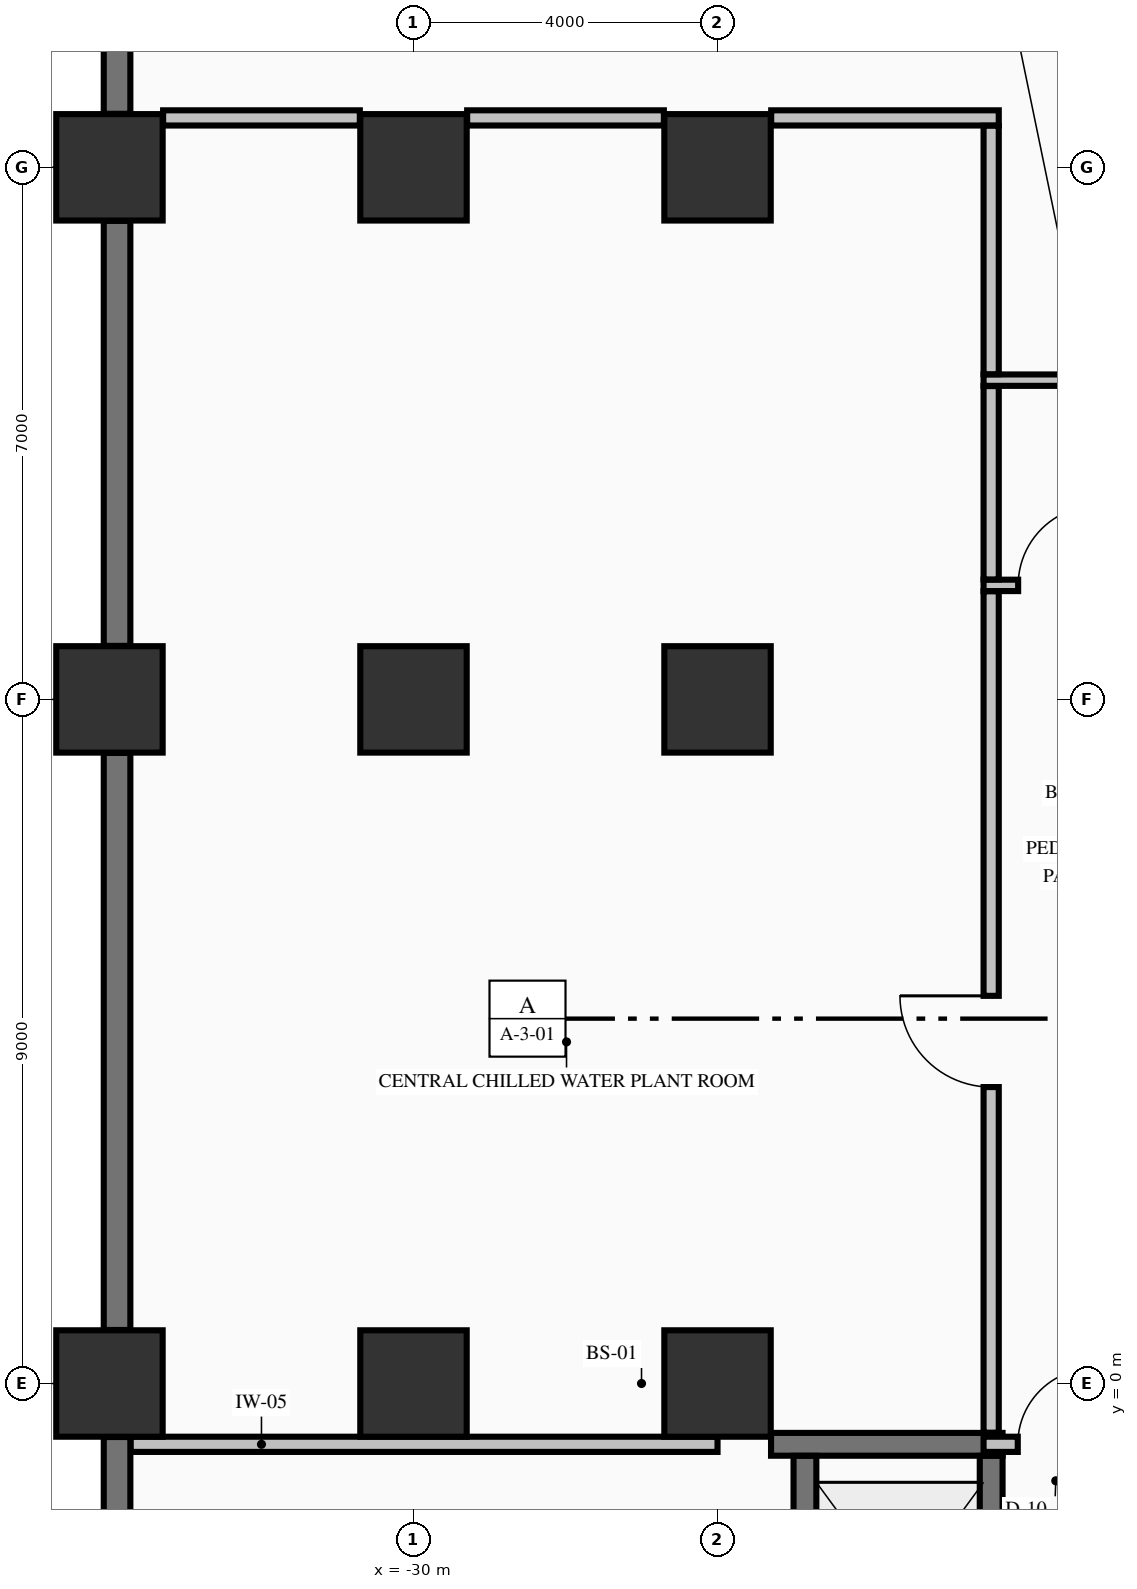
"""IFC4 building model, lengths in metres.
Left out: names, types, materials, properties, quantities, classifications, styles, units other than length and angle.
Written with IfcOpenShell. Run it as: python <this file> out.ifc"""

import sys

from ifc_helpers import new_model, si_unit, direction, frame, frame_2d, origin, origin_2d, place, context, subcontext, project, spatial, rectangle, extrude, element, fill, save


model = new_model("IFC4")
c1 = context("Model", 3, precision=1e-05, world=origin(), true_north=direction((0.0, 1.0)))
c2 = subcontext(c1, "Body", "Model", "MODEL_VIEW")
j1 = project(units=[si_unit("LENGTHUNIT", "METRE"), si_unit("PLANEANGLEUNIT", "RADIAN")], contexts=[c1])
p1 = place(None, origin())
s1 = spatial("IfcSite", under=j1, at=p1, CompositionType="ELEMENT")
p2 = place(p1, origin())
s2 = spatial("IfcBuilding", under=s1, at=p2, CompositionType="ELEMENT")
p3 = place(p2, frame((0.0, 0.0, -9.1)))
s3 = spatial("IfcBuildingStorey", under=s2, at=p3, CompositionType="ELEMENT", Elevation=-9.1)
for number, where, z_axis, x_axis in (
    (1, (-34.0, 0.0, -0.45), (0.0, 0.0, 1.0), (1.0, 0.0, 0.0)),
    (2, (-34.0, 9.0, -0.45), (0.0, 0.0, 1.0), (1.0, 0.0, 0.0)),
    (3, (-34.0, 16.0, -0.45), (0.0, 0.0, 1.0), (1.0, 0.0, 0.0)),
    (4, (-30.0, 0.0, -0.45), (0.0, 0.0, 1.0), (1.0, 0.0, 0.0)),
    (5, (-30.0, 9.0, -0.45), (0.0, 0.0, 1.0), (1.0, 0.0, 0.0)),
    (6, (-30.0, 16.0, -0.45), (0.0, 0.0, 1.0), (1.0, 0.0, 0.0)),
    (7, (-26.0, 0.0, -0.45), (0.0, 0.0, 1.0), (1.0, 0.0, 0.0)),
    (8, (-26.0, 9.0, -0.45), (0.0, 0.0, 1.0), (1.0, 0.0, 0.0)),
    (9, (-26.0, 16.0, -0.45), (0.0, 0.0, 1.0), (1.0, 0.0, 0.0)),
):
    element("IfcColumn", number, at=place(p3, frame(where, z_axis=z_axis, x_axis=x_axis)), inside=s3, PredefinedType="COLUMN", context=c2, shape_type="SweptSolid", body=[
        extrude(rectangle(XDim=1.4, YDim=1.4, at=origin_2d()), origin(), (0.0, 0.0, 1.0), 4.65),
    ])
p4 = place(p3, frame((-25.296, -0.8, 0.0), z_axis=(0.0, 0.0, 1.0), x_axis=(1.0, 0.0, 0.0)))
e10 = element("IfcWall", 10, at=p4, inside=s3, PredefinedType="SHEAR", context=c2, shape_type="SweptSolid", body=[
    extrude(rectangle(XDim=3.046, YDim=0.3, at=frame_2d((1.523, 0.0))), origin(), (0.0, 0.0, 1.0), 4.2),
])
p5 = place(p3, frame((-33.722, -0.8, 0.0), z_axis=(0.0, 0.0, 1.0), x_axis=(1.0, 0.0, 0.0)))
e11 = element("IfcWall", 11, at=p5, inside=s3, PredefinedType="PARTITIONING", context=c2, shape_type="SweptSolid", body=[
    extrude(rectangle(XDim=7.722, YDim=0.2, at=frame_2d((3.861, 0.0))), origin(), (0.0, 0.0, 1.0), 4.2),
])
p6 = place(p3, frame((-22.5, -0.8, 0.0), z_axis=(0.0, 0.0, 1.0), x_axis=(1.0, 0.0, 0.0)))
e12 = element("IfcWall", 12, at=p6, inside=s3, PredefinedType="PARTITIONING", context=c2, shape_type="SweptSolid", body=[
    extrude(rectangle(XDim=1.694, YDim=0.2, at=frame_2d((0.847, 0.0))), origin(), (0.0, 0.0, 1.0), 4.2),
])
p7 = place(p6, frame((0.45, 0.0, 0.0)))
e13 = element("IfcOpeningElement", 13, at=p7, cuts=e12, PredefinedType="OPENING", context=c2, shape_type="SweptSolid", body=[
    extrude(rectangle(XDim=1.0, YDim=2.15, at=frame_2d((0.5, 1.075))), frame((0.0, 0.11, 0.0), z_axis=(0.0, -1.0, 0.0), x_axis=(1.0, 0.0, 0.0)), (0.0, 0.0, 1.0), 0.22),
])
p8 = place(p3, frame((-22.5, 10.5, 0.0), z_axis=(0.0, 0.0, 1.0), x_axis=(1.0, 0.0, 0.0)))
e14 = element("IfcWall", 14, at=p8, inside=s3, PredefinedType="PARTITIONING", context=c2, shape_type="SweptSolid", body=[
    extrude(rectangle(XDim=2.5, YDim=0.15, at=frame_2d((1.25, 0.0))), origin(), (0.0, 0.0, 1.0), 4.2),
])
p9 = place(p8, frame((0.455, 0.0, 0.0)))
e15 = element("IfcOpeningElement", 15, at=p9, cuts=e14, PredefinedType="OPENING", context=c2, shape_type="SweptSolid", body=[
    extrude(rectangle(XDim=1.05, YDim=2.15, at=frame_2d((0.525, 1.075))), frame((0.0, 0.085, 0.0), z_axis=(0.0, -1.0, 0.0), x_axis=(1.0, 0.0, 0.0)), (0.0, 0.0, 1.0), 0.17),
])
p10 = place(p3, frame((-22.5, 13.2, 0.0), z_axis=(0.0, 0.0, 1.0), x_axis=(1.0, 0.0, 0.0)))
e16 = element("IfcWall", 16, at=p10, inside=s3, PredefinedType="PARTITIONING", context=c2, shape_type="SweptSolid", body=[
    extrude(rectangle(XDim=45.0, YDim=0.15, at=frame_2d((22.5, 0.0))), origin(), (0.0, 0.0, 1.0), 4.2),
])
p11 = place(p10, frame((43.15, 0.0, 0.0)))
e17 = element("IfcOpeningElement", 17, at=p11, cuts=e16, PredefinedType="OPENING", context=c2, shape_type="SweptSolid", body=[
    extrude(rectangle(XDim=1.1, YDim=2.15, at=frame_2d((0.55, 1.075))), frame((0.0, 0.085, 0.0), z_axis=(0.0, -1.0, 0.0), x_axis=(1.0, 0.0, 0.0)), (0.0, 0.0, 1.0), 0.17),
])
p12 = place(p10, frame((27.4, 0.0, 0.0)))
e18 = element("IfcOpeningElement", 18, at=p12, cuts=e16, PredefinedType="OPENING", context=c2, shape_type="SweptSolid", body=[
    extrude(rectangle(XDim=1.2, YDim=2.15, at=frame_2d((0.6, 1.075))), frame((0.0, 0.085, 0.0), z_axis=(0.0, -1.0, 0.0), x_axis=(1.0, 0.0, 0.0)), (0.0, 0.0, 1.0), 0.17),
])
for number, where, z_axis, x_axis in (
    (19, (-33.294, 16.65, 0.0), (0.0, 0.0, 1.0), (1.0, 0.0, 0.0)),
    (20, (-29.294, 16.65, 0.0), (0.0, 0.0, 1.0), (1.0, 0.0, 0.0)),
):
    element("IfcWall", number, at=place(p3, frame(where, z_axis=z_axis, x_axis=x_axis)), inside=s3, PredefinedType="PARTITIONING", context=c2, shape_type="SweptSolid", body=[
        extrude(rectangle(XDim=2.588, YDim=0.2, at=frame_2d((1.294, 0.0))), origin(), (0.0, 0.0, 1.0), 4.2),
    ])
p13 = place(p3, frame((-25.294, 16.65, 0.0), z_axis=(0.0, 0.0, 1.0), x_axis=(1.0, 0.0, 0.0)))
e21 = element("IfcWall", 21, at=p13, inside=s3, PredefinedType="PARTITIONING", context=c2, shape_type="SweptSolid", body=[
    extrude(rectangle(XDim=2.994, YDim=0.2, at=frame_2d((1.497, 0.0))), origin(), (0.0, 0.0, 1.0), 4.2),
])
for number, where, z_axis, x_axis in (
    (22, (-33.9, -8.296, 0.0), (0.0, 0.0, 1.0), (0.0, 1.0, 0.0)),
    (23, (-33.9, 0.704, 0.0), (0.0, 0.0, 1.0), (0.0, 1.0, 0.0)),
):
    element("IfcWall", number, at=place(p3, frame(where, z_axis=z_axis, x_axis=x_axis)), inside=s3, PredefinedType="SHEAR", context=c2, shape_type="SweptSolid", body=[
        extrude(rectangle(XDim=7.592, YDim=0.35, at=frame_2d((3.796, 0.0))), origin(), (0.0, 0.0, 1.0), 4.2),
    ])
p14 = place(p3, frame((-33.9, 9.704, 0.0), z_axis=(0.0, 0.0, 1.0), x_axis=(0.0, 1.0, 0.0)))
e24 = element("IfcWall", 24, at=p14, inside=s3, PredefinedType="SHEAR", context=c2, shape_type="SweptSolid", body=[
    extrude(rectangle(XDim=5.592, YDim=0.35, at=frame_2d((2.796, 0.0))), origin(), (0.0, 0.0, 1.0), 4.2),
])
p15 = place(p3, frame((-33.9, 16.704, 0.0), z_axis=(0.0, 0.0, 1.0), x_axis=(0.0, 1.0, 0.0)))
e25 = element("IfcWall", 25, at=p15, inside=s3, PredefinedType="SHEAR", context=c2, shape_type="SweptSolid", body=[
    extrude(rectangle(XDim=4.592, YDim=0.35, at=frame_2d((2.296, 0.0))), origin(), (0.0, 0.0, 1.0), 4.2),
])
p16 = place(p3, frame((-24.85, -4.648, 0.0), z_axis=(0.0, 0.0, 1.0), x_axis=(0.0, 1.0, 0.0)))
e26 = element("IfcWall", 26, at=p16, inside=s3, PredefinedType="SHEAR", context=c2, shape_type="SweptSolid", body=[
    extrude(rectangle(XDim=3.696, YDim=0.3, at=frame_2d((1.848, 0.0))), origin(), (0.0, 0.0, 1.0), 4.2),
])
p17 = place(p3, frame((-22.4, -4.648, 0.0), z_axis=(0.0, 0.0, 1.0), x_axis=(0.0, 1.0, 0.0)))
e27 = element("IfcWall", 27, at=p17, inside=s3, PredefinedType="SHEAR", context=c2, shape_type="SweptSolid", body=[
    extrude(rectangle(XDim=3.696, YDim=0.3, at=frame_2d((1.848, 0.0))), origin(), (0.0, 0.0, 1.0), 4.2),
])
p18 = place(p17, frame((1.198, 0.0, 0.0)))
e28 = element("IfcOpeningElement", 28, at=p18, cuts=e27, PredefinedType="OPENING", context=c2, shape_type="SweptSolid", body=[
    extrude(rectangle(XDim=1.3, YDim=2.3, at=frame_2d((0.65, 1.15))), frame((0.0, 0.16, 0.0), z_axis=(0.0, -1.0, 0.0), x_axis=(1.0, 0.0, 0.0)), (0.0, 0.0, 1.0), 0.32),
])
p19 = place(p3, frame((-22.4, -0.647, 0.0), z_axis=(0.0, 0.0, 1.0), x_axis=(0.0, 1.0, 0.0)))
e29 = element("IfcWall", 29, at=p19, inside=s3, PredefinedType="PARTITIONING", context=c2, shape_type="SweptSolid", body=[
    extrude(rectangle(XDim=11.069, YDim=0.2, at=frame_2d((5.535, 0.0))), origin(), (0.0, 0.0, 1.0), 4.2),
])
p20 = place(p19, frame((4.547, 0.0, 0.0)))
e30 = element("IfcOpeningElement", 30, at=p20, cuts=e29, PredefinedType="OPENING", context=c2, shape_type="SweptSolid", body=[
    extrude(rectangle(XDim=1.2, YDim=2.15, at=frame_2d((0.6, 1.075))), frame((0.0, 0.11, 0.0), z_axis=(0.0, -1.0, 0.0), x_axis=(1.0, 0.0, 0.0)), (0.0, 0.0, 1.0), 0.22),
])
p21 = place(p3, frame((-22.4, 10.578, 0.0), z_axis=(0.0, 0.0, 1.0), x_axis=(0.0, 1.0, 0.0)))
e31 = element("IfcWall", 31, at=p21, inside=s3, PredefinedType="PARTITIONING", context=c2, shape_type="SweptSolid", body=[
    extrude(rectangle(XDim=2.544, YDim=0.2, at=frame_2d((1.272, 0.0))), origin(), (0.0, 0.0, 1.0), 4.2),
])
p22 = place(p3, frame((-22.4, 13.278, 0.0), z_axis=(0.0, 0.0, 1.0), x_axis=(0.0, 1.0, 0.0)))
e32 = element("IfcWall", 32, at=p22, inside=s3, PredefinedType="PARTITIONING", context=c2, shape_type="SweptSolid", body=[
    extrude(rectangle(XDim=3.269, YDim=0.2, at=frame_2d((1.635, 0.0))), origin(), (0.0, 0.0, 1.0), 4.2),
])
p23 = place(p7, origin())
e33 = element("IfcDoor", 33, at=p23, inside=s3, OperationType="SINGLE_SWING_RIGHT", PredefinedType="DOOR", context=c2, shape_type="SweptSolid", body=[
    extrude(rectangle(XDim=1.0, YDim=2.15, at=frame_2d((0.5, 1.075))), frame((0.0, 0.025, 0.0), z_axis=(0.0, -1.0, 0.0), x_axis=(1.0, 0.0, 0.0)), (0.0, 0.0, 1.0), 0.05),
])
fill(e13, e33)
p24 = place(p9, origin())
e34 = element("IfcDoor", 34, at=p24, inside=s3, OperationType="SINGLE_SWING_RIGHT", PredefinedType="DOOR", context=c2, shape_type="SweptSolid", body=[
    extrude(rectangle(XDim=1.05, YDim=2.15, at=frame_2d((0.525, 1.075))), frame((0.0, 0.025, 0.0), z_axis=(0.0, -1.0, 0.0), x_axis=(1.0, 0.0, 0.0)), (0.0, 0.0, 1.0), 0.05),
])
fill(e15, e34)
p25 = place(p20, origin())
e35 = element("IfcDoor", 35, at=p25, inside=s3, OperationType="SINGLE_SWING_RIGHT", PredefinedType="DOOR", context=c2, shape_type="SweptSolid", body=[
    extrude(rectangle(XDim=1.2, YDim=2.15, at=frame_2d((0.6, 1.075))), frame((0.0, 0.025, 0.0), z_axis=(0.0, -1.0, 0.0), x_axis=(1.0, 0.0, 0.0)), (0.0, 0.0, 1.0), 0.05),
])
fill(e30, e35)
save(model, sys.argv[1])
